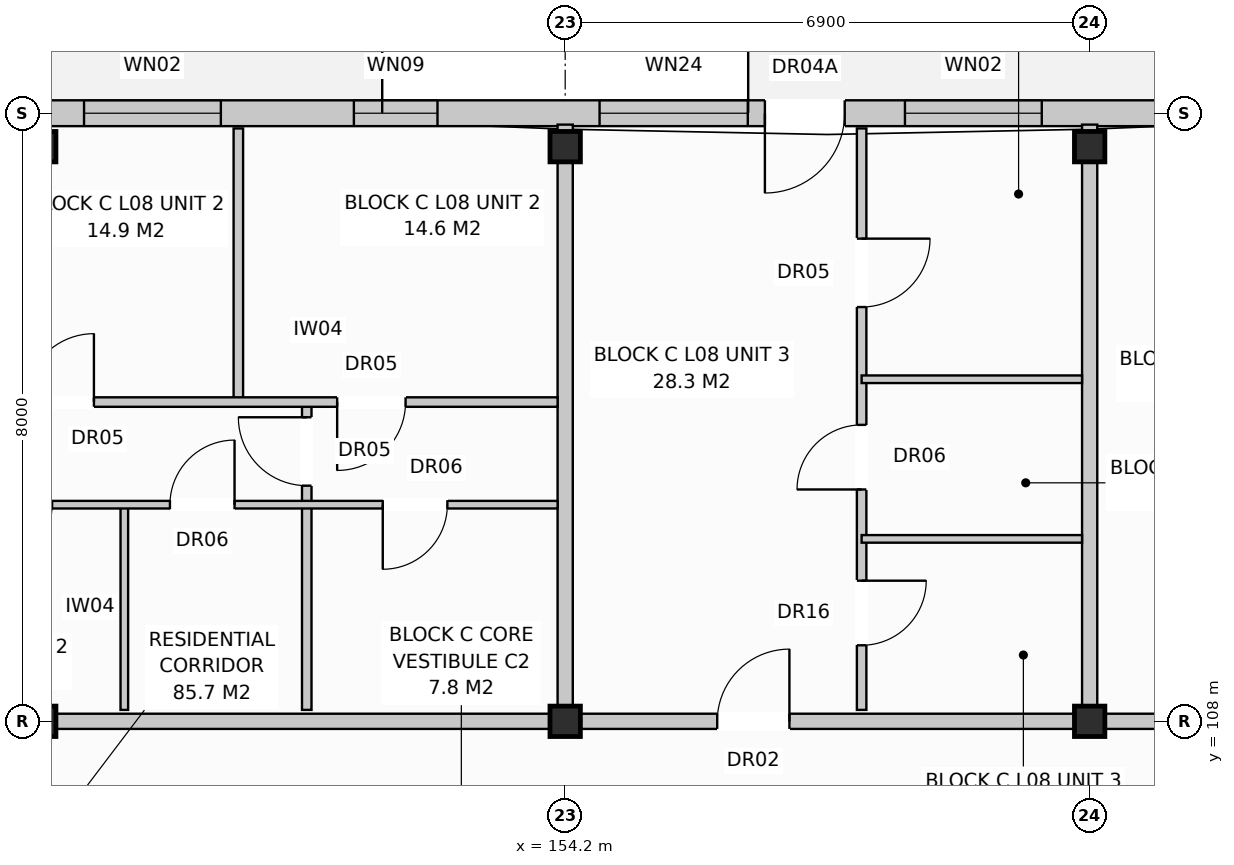
"""IFC4 building model, lengths in metres.
Left out: names, types, materials, properties, quantities, classifications, styles, units other than length and angle.
Written with IfcOpenShell. Run it as: python <this file> out.ifc"""

import sys

from ifc_helpers import new_model, si_unit, direction, frame, frame_2d, origin, origin_with_axes, origin_2d, place, context, subcontext, project, spatial, rectangle, extrude, element, fill, save


model = new_model("IFC4")
c1 = context("Model", 3, precision=1e-05, world=origin(), true_north=direction((0.0, 1.0)))
c2 = subcontext(c1, "Body", "Model", "MODEL_VIEW")
j1 = project(units=[si_unit("LENGTHUNIT", "METRE"), si_unit("PLANEANGLEUNIT", "RADIAN")], contexts=[c1])
p1 = place(None, origin())
s1 = spatial("IfcSite", under=j1, at=p1, CompositionType="ELEMENT")
p2 = place(p1, origin())
s2 = spatial("IfcBuilding", under=s1, at=p2, CompositionType="ELEMENT")
p3 = place(p2, frame((0.0, 0.0, 27.2)))
s3 = spatial("IfcBuildingStorey", under=s2, at=p3, CompositionType="ELEMENT", Elevation=27.2)
for number, where, z_axis, x_axis in (
    (1, (147.3, 108.0, 0.0), (0.0, 0.0, 1.0), (1.0, 0.0, 0.0)),
    (2, (147.3, 115.56, 0.0), (0.0, 0.0, 1.0), (1.0, 0.0, 0.0)),
    (3, (154.2, 108.0, 0.0), (0.0, 0.0, 1.0), (1.0, 0.0, 0.0)),
    (4, (154.2, 115.56, 0.0), (0.0, 0.0, 1.0), (1.0, 0.0, 0.0)),
    (5, (161.1, 108.0, 0.0), (0.0, 0.0, 1.0), (1.0, 0.0, 0.0)),
    (6, (161.1, 115.56, 0.0), (0.0, 0.0, 1.0), (1.0, 0.0, 0.0)),
):
    element("IfcColumn", number, at=place(p3, frame(where, z_axis=z_axis, x_axis=x_axis)), inside=s3, PredefinedType="COLUMN", context=c2, shape_type="SweptSolid", body=[
        extrude(rectangle(XDim=0.4, YDim=0.4, at=origin_2d()), origin(), (0.0, 0.0, 1.0), 3.2),
    ])
p4 = place(p3, frame((126.76, 116.0, 0.0), z_axis=(0.0, 0.0, 1.0), x_axis=(1.0, 0.0, 0.0)))
e7 = element("IfcWall", 7, at=p4, inside=s3, PredefinedType="STANDARD", context=c2, shape_type="SweptSolid", body=[
    extrude(rectangle(XDim=41.08, YDim=0.34, at=frame_2d((20.54, 0.0))), origin(), (0.0, 0.0, 1.0), 2.96),
])
p5 = place(p4, frame((2.767, 0.0, 0.0)))
e8 = element("IfcOpeningElement", 8, at=p5, cuts=e7, PredefinedType="OPENING", context=c2, shape_type="SweptSolid", body=[
    extrude(rectangle(XDim=1.05, YDim=2.12, at=frame_2d((0.525, 1.06))), frame((0.0, 0.182, 0.0), z_axis=(0.0, -1.0, 0.0), x_axis=(1.0, 0.0, 0.0)), (0.0, 0.0, 1.0), 0.364),
])
p6 = place(p4, frame((17.567, 0.0, 0.0)))
e9 = element("IfcOpeningElement", 9, at=p6, cuts=e7, PredefinedType="OPENING", context=c2, shape_type="SweptSolid", body=[
    extrude(rectangle(XDim=1.05, YDim=2.12, at=frame_2d((0.525, 1.06))), frame((0.0, 0.182, 0.0), z_axis=(0.0, -1.0, 0.0), x_axis=(1.0, 0.0, 0.0)), (0.0, 0.0, 1.0), 0.364),
])
p7 = place(p4, frame((30.067, 0.0, 0.0)))
e10 = element("IfcOpeningElement", 10, at=p7, cuts=e7, PredefinedType="OPENING", context=c2, shape_type="SweptSolid", body=[
    extrude(rectangle(XDim=1.05, YDim=2.12, at=frame_2d((0.525, 1.06))), frame((0.0, 0.182, 0.0), z_axis=(0.0, -1.0, 0.0), x_axis=(1.0, 0.0, 0.0)), (0.0, 0.0, 1.0), 0.364),
])
p8 = place(p4, frame((0.642, 0.0, 0.8)))
e11 = element("IfcOpeningElement", 11, at=p8, cuts=e7, PredefinedType="OPENING", context=c2, shape_type="SweptSolid", body=[
    extrude(rectangle(XDim=1.9, YDim=1.85, at=frame_2d((0.95, 0.925))), frame((0.0, 0.182, 0.0), z_axis=(0.0, -1.0, 0.0), x_axis=(1.0, 0.0, 0.0)), (0.0, 0.0, 1.0), 0.364),
])
p9 = place(p4, frame((4.41, 0.0, 0.8)))
e12 = element("IfcOpeningElement", 12, at=p9, cuts=e7, PredefinedType="OPENING", context=c2, shape_type="SweptSolid", body=[
    extrude(rectangle(XDim=1.8, YDim=1.7, at=frame_2d((0.9, 0.85))), frame((0.0, 0.182, 0.0), z_axis=(0.0, -1.0, 0.0), x_axis=(1.0, 0.0, 0.0)), (0.0, 0.0, 1.0), 0.364),
])
p10 = place(p4, frame((10.46, 0.0, 0.72)))
e13 = element("IfcOpeningElement", 13, at=p10, cuts=e7, PredefinedType="OPENING", context=c2, shape_type="SweptSolid", body=[
    extrude(rectangle(XDim=1.1, YDim=1.5, at=frame_2d((0.55, 0.75))), frame((0.0, 0.182, 0.0), z_axis=(0.0, -1.0, 0.0), x_axis=(1.0, 0.0, 0.0)), (0.0, 0.0, 1.0), 0.364),
])
p11 = place(p4, frame((15.76, 0.0, 0.72)))
e14 = element("IfcOpeningElement", 14, at=p11, cuts=e7, PredefinedType="OPENING", context=c2, shape_type="SweptSolid", body=[
    extrude(rectangle(XDim=1.1, YDim=1.5, at=frame_2d((0.55, 0.75))), frame((0.0, 0.182, 0.0), z_axis=(0.0, -1.0, 0.0), x_axis=(1.0, 0.0, 0.0)), (0.0, 0.0, 1.0), 0.364),
])
p12 = place(p4, frame((21.11, 0.0, 0.8)))
e15 = element("IfcOpeningElement", 15, at=p12, cuts=e7, PredefinedType="OPENING", context=c2, shape_type="SweptSolid", body=[
    extrude(rectangle(XDim=1.8, YDim=1.7, at=frame_2d((0.9, 0.85))), frame((0.0, 0.182, 0.0), z_axis=(0.0, -1.0, 0.0), x_axis=(1.0, 0.0, 0.0)), (0.0, 0.0, 1.0), 0.364),
])
p13 = place(p4, frame((24.66, 0.0, 0.72)))
e16 = element("IfcOpeningElement", 16, at=p13, cuts=e7, PredefinedType="OPENING", context=c2, shape_type="SweptSolid", body=[
    extrude(rectangle(XDim=1.1, YDim=1.5, at=frame_2d((0.55, 0.75))), frame((0.0, 0.182, 0.0), z_axis=(0.0, -1.0, 0.0), x_axis=(1.0, 0.0, 0.0)), (0.0, 0.0, 1.0), 0.364),
])
p14 = place(p4, frame((27.892, 0.0, 0.8)))
e17 = element("IfcOpeningElement", 17, at=p14, cuts=e7, PredefinedType="OPENING", context=c2, shape_type="SweptSolid", body=[
    extrude(rectangle(XDim=1.95, YDim=1.65, at=frame_2d((0.975, 0.825))), frame((0.0, 0.182, 0.0), z_axis=(0.0, -1.0, 0.0), x_axis=(1.0, 0.0, 0.0)), (0.0, 0.0, 1.0), 0.364),
])
p15 = place(p4, frame((31.91, 0.0, 0.8)))
e18 = element("IfcOpeningElement", 18, at=p15, cuts=e7, PredefinedType="OPENING", context=c2, shape_type="SweptSolid", body=[
    extrude(rectangle(XDim=1.8, YDim=1.7, at=frame_2d((0.9, 0.85))), frame((0.0, 0.182, 0.0), z_axis=(0.0, -1.0, 0.0), x_axis=(1.0, 0.0, 0.0)), (0.0, 0.0, 1.0), 0.364),
])
p16 = place(p4, frame((35.36, 0.0, 0.72)))
e19 = element("IfcOpeningElement", 19, at=p16, cuts=e7, PredefinedType="OPENING", context=c2, shape_type="SweptSolid", body=[
    extrude(rectangle(XDim=1.9, YDim=1.85, at=frame_2d((0.95, 0.925))), frame((0.0, 0.182, 0.0), z_axis=(0.0, -1.0, 0.0), x_axis=(1.0, 0.0, 0.0)), (0.0, 0.0, 1.0), 0.364),
])
p17 = place(p4, frame((38.525, 0.0, 0.8)))
e20 = element("IfcOpeningElement", 20, at=p17, cuts=e7, PredefinedType="OPENING", context=c2, shape_type="SweptSolid", body=[
    extrude(rectangle(XDim=1.95, YDim=1.65, at=frame_2d((0.975, 0.825))), frame((0.0, 0.182, 0.0), z_axis=(0.0, -1.0, 0.0), x_axis=(1.0, 0.0, 0.0)), (0.0, 0.0, 1.0), 0.364),
])
p18 = place(p3, frame((154.2, 108.15, 0.0), z_axis=(0.0, 0.0, 1.0), x_axis=(0.0, 1.0, 0.0)))
e21 = element("IfcWall", 21, at=p18, inside=s3, PredefinedType="PARTITIONING", context=c2, shape_type="SweptSolid", body=[
    extrude(rectangle(XDim=7.7, YDim=0.2, at=frame_2d((3.85, 0.0))), origin(), (0.0, 0.0, 1.0), 2.96),
])
p19 = place(p3, frame((140.4, 108.0, 0.0), z_axis=(0.0, 0.0, 1.0), x_axis=(1.0, 0.0, 0.0)))
e22 = element("IfcWall", 22, at=p19, inside=s3, PredefinedType="PARTITIONING", context=c2, shape_type="SweptSolid", body=[
    extrude(rectangle(XDim=13.8, YDim=0.2, at=frame_2d((6.9, 0.0))), origin(), (0.0, 0.0, 1.0), 2.4),
])
p20 = place(p19, frame((2.4, 0.0, 0.0)))
e23 = element("IfcOpeningElement", 23, at=p20, cuts=e22, PredefinedType="OPENING", context=c2, shape_type="SweptSolid", body=[
    extrude(rectangle(XDim=0.95, YDim=2.15, at=frame_2d((0.475, 1.075))), frame((0.0, 0.112, 0.0), z_axis=(0.0, -1.0, 0.0), x_axis=(1.0, 0.0, 0.0)), (0.0, 0.0, 1.0), 0.224),
])
p21 = place(p3, frame((148.4, 108.15, 0.0), z_axis=(0.0, 0.0, 1.0), x_axis=(0.0, 1.0, 0.0)))
e24 = element("IfcWall", 24, at=p21, inside=s3, PredefinedType="PARTITIONING", context=c2, shape_type="SweptSolid", body=[
    extrude(rectangle(XDim=2.7, YDim=0.1, at=frame_2d((1.35, 0.0))), origin(), (0.0, 0.0, 1.0), 2.96),
])
p22 = place(p3, frame((150.8, 108.15, 0.0), z_axis=(0.0, 0.0, 1.0), x_axis=(0.0, 1.0, 0.0)))
e25 = element("IfcWall", 25, at=p22, inside=s3, PredefinedType="PARTITIONING", context=c2, shape_type="SweptSolid", body=[
    extrude(rectangle(XDim=4.05, YDim=0.125, at=frame_2d((2.025, 0.0))), origin(), (0.0, 0.0, 1.0), 2.59),
])
p23 = place(p22, frame((2.95, 0.0, 0.0)))
e26 = element("IfcOpeningElement", 26, at=p23, cuts=e25, PredefinedType="OPENING", context=c2, shape_type="SweptSolid", body=[
    extrude(rectangle(XDim=0.9, YDim=2.1, at=frame_2d((0.45, 1.05))), frame((0.0, 0.074, 0.0), z_axis=(0.0, -1.0, 0.0), x_axis=(1.0, 0.0, 0.0)), (0.0, 0.0, 1.0), 0.149),
])
p24 = place(p3, frame((149.9, 112.2, 0.0), z_axis=(0.0, 0.0, 1.0), x_axis=(0.0, 1.0, 0.0)))
e27 = element("IfcWall", 27, at=p24, inside=s3, PredefinedType="PARTITIONING", context=c2, shape_type="SweptSolid", body=[
    extrude(rectangle(XDim=3.6, YDim=0.125, at=frame_2d((1.8, 0.0))), origin(), (0.0, 0.0, 1.0), 2.96),
])
p25 = place(p3, frame((145.6, 110.85, 0.0), z_axis=(0.0, 0.0, 1.0), x_axis=(1.0, 0.0, 0.0)))
e28 = element("IfcWall", 28, at=p25, inside=s3, PredefinedType="PARTITIONING", context=c2, shape_type="SweptSolid", body=[
    extrude(rectangle(XDim=8.5, YDim=0.1, at=frame_2d((4.25, 0.0))), origin(), (0.0, 0.0, 1.0), 2.96),
])
p26 = place(p25, frame((1.0, 0.0, 0.0)))
e29 = element("IfcOpeningElement", 29, at=p26, cuts=e28, PredefinedType="OPENING", context=c2, shape_type="SweptSolid", body=[
    extrude(rectangle(XDim=0.85, YDim=2.1, at=frame_2d((0.425, 1.05))), frame((0.0, 0.062, 0.0), z_axis=(0.0, -1.0, 0.0), x_axis=(1.0, 0.0, 0.0)), (0.0, 0.0, 1.0), 0.124),
])
p27 = place(p25, frame((3.4, 0.0, 0.0)))
e30 = element("IfcOpeningElement", 30, at=p27, cuts=e28, PredefinedType="OPENING", context=c2, shape_type="SweptSolid", body=[
    extrude(rectangle(XDim=0.85, YDim=2.05, at=frame_2d((0.425, 1.025))), frame((0.0, 0.062, 0.0), z_axis=(0.0, -1.0, 0.0), x_axis=(1.0, 0.0, 0.0)), (0.0, 0.0, 1.0), 0.124),
])
p28 = place(p25, frame((6.2, 0.0, 0.0)))
e31 = element("IfcOpeningElement", 31, at=p28, cuts=e28, PredefinedType="OPENING", context=c2, shape_type="SweptSolid", body=[
    extrude(rectangle(XDim=0.85, YDim=2.05, at=frame_2d((0.425, 1.025))), frame((0.0, 0.062, 0.0), z_axis=(0.0, -1.0, 0.0), x_axis=(1.0, 0.0, 0.0)), (0.0, 0.0, 1.0), 0.124),
])
p29 = place(p3, frame((145.6, 112.2, 0.0), z_axis=(0.0, 0.0, 1.0), x_axis=(1.0, 0.0, 0.0)))
e32 = element("IfcWall", 32, at=p29, inside=s3, PredefinedType="PARTITIONING", context=c2, shape_type="SweptSolid", body=[
    extrude(rectangle(XDim=8.5, YDim=0.125, at=frame_2d((4.25, 0.0))), origin(), (0.0, 0.0, 1.0), 2.96),
])
p30 = place(p29, frame((1.5, 0.0, 0.0)))
e33 = element("IfcOpeningElement", 33, at=p30, cuts=e32, PredefinedType="OPENING", context=c2, shape_type="SweptSolid", body=[
    extrude(rectangle(XDim=0.9, YDim=2.1, at=frame_2d((0.45, 1.05))), frame((0.0, 0.074, 0.0), z_axis=(0.0, -1.0, 0.0), x_axis=(1.0, 0.0, 0.0)), (0.0, 0.0, 1.0), 0.149),
])
p31 = place(p29, frame((5.6, 0.0, 0.0)))
e34 = element("IfcOpeningElement", 34, at=p31, cuts=e32, PredefinedType="OPENING", context=c2, shape_type="SweptSolid", body=[
    extrude(rectangle(XDim=0.9, YDim=2.1, at=frame_2d((0.45, 1.05))), frame((0.0, 0.074, 0.0), z_axis=(0.0, -1.0, 0.0), x_axis=(1.0, 0.0, 0.0)), (0.0, 0.0, 1.0), 0.149),
])
p32 = place(p3, frame((161.1, 108.15, 0.0), z_axis=(0.0, 0.0, 1.0), x_axis=(0.0, 1.0, 0.0)))
e35 = element("IfcWall", 35, at=p32, inside=s3, PredefinedType="PARTITIONING", context=c2, shape_type="SweptSolid", body=[
    extrude(rectangle(XDim=7.7, YDim=0.2, at=frame_2d((3.85, 0.0))), origin(), (0.0, 0.0, 1.0), 2.4),
])
p33 = place(p3, frame((154.2, 108.0, 0.0), z_axis=(0.0, 0.0, 1.0), x_axis=(1.0, 0.0, 0.0)))
e36 = element("IfcWall", 36, at=p33, inside=s3, PredefinedType="PARTITIONING", context=c2, shape_type="SweptSolid", body=[
    extrude(rectangle(XDim=6.9, YDim=0.2, at=frame_2d((3.45, 0.0))), origin(), (0.0, 0.0, 1.0), 2.4),
])
p34 = place(p33, frame((2.0, 0.0, 0.0)))
e37 = element("IfcOpeningElement", 37, at=p34, cuts=e36, PredefinedType="OPENING", context=c2, shape_type="SweptSolid", body=[
    extrude(rectangle(XDim=0.95, YDim=2.15, at=frame_2d((0.475, 1.075))), frame((0.0, 0.112, 0.0), z_axis=(0.0, -1.0, 0.0), x_axis=(1.0, 0.0, 0.0)), (0.0, 0.0, 1.0), 0.224),
])
p35 = place(p3, frame((158.1, 108.15, 0.0), z_axis=(0.0, 0.0, 1.0), x_axis=(0.0, 1.0, 0.0)))
e38 = element("IfcWall", 38, at=p35, inside=s3, PredefinedType="PARTITIONING", context=c2, shape_type="SweptSolid", body=[
    extrude(rectangle(XDim=7.65, YDim=0.125, at=frame_2d((3.825, 0.0))), origin(), (0.0, 0.0, 1.0), 2.96),
])
p36 = place(p35, frame((0.85, 0.0, 0.0)))
e39 = element("IfcOpeningElement", 39, at=p36, cuts=e38, PredefinedType="OPENING", context=c2, shape_type="SweptSolid", body=[
    extrude(rectangle(XDim=0.85, YDim=2.1, at=frame_2d((0.425, 1.05))), frame((0.0, 0.074, 0.0), z_axis=(0.0, -1.0, 0.0), x_axis=(1.0, 0.0, 0.0)), (0.0, 0.0, 1.0), 0.149),
])
p37 = place(p35, frame((2.9, 0.0, 0.0)))
e40 = element("IfcOpeningElement", 40, at=p37, cuts=e38, PredefinedType="OPENING", context=c2, shape_type="SweptSolid", body=[
    extrude(rectangle(XDim=0.85, YDim=2.05, at=frame_2d((0.425, 1.025))), frame((0.0, 0.074, 0.0), z_axis=(0.0, -1.0, 0.0), x_axis=(1.0, 0.0, 0.0)), (0.0, 0.0, 1.0), 0.149),
])
p38 = place(p35, frame((5.3, 0.0, 0.0)))
e41 = element("IfcOpeningElement", 41, at=p38, cuts=e38, PredefinedType="OPENING", context=c2, shape_type="SweptSolid", body=[
    extrude(rectangle(XDim=0.9, YDim=2.1, at=frame_2d((0.45, 1.05))), frame((0.0, 0.074, 0.0), z_axis=(0.0, -1.0, 0.0), x_axis=(1.0, 0.0, 0.0)), (0.0, 0.0, 1.0), 0.149),
])
for number, where, z_axis, x_axis in (
    (42, (158.1, 110.4, 0.0), (0.0, 0.0, 1.0), (1.0, 0.0, 0.0)),
    (43, (158.1, 112.5, 0.0), (0.0, 0.0, 1.0), (1.0, 0.0, 0.0)),
):
    element("IfcWall", number, at=place(p3, frame(where, z_axis=z_axis, x_axis=x_axis)), inside=s3, PredefinedType="PARTITIONING", context=c2, shape_type="SweptSolid", body=[
        extrude(rectangle(XDim=2.9, YDim=0.1, at=frame_2d((1.45, 0.0))), origin(), (0.0, 0.0, 1.0), 2.96),
    ])
p39 = place(p3, frame((161.1, 108.0, 0.0), z_axis=(0.0, 0.0, 1.0), x_axis=(1.0, 0.0, 0.0)))
e44 = element("IfcWall", 44, at=p39, inside=s3, PredefinedType="PARTITIONING", context=c2, shape_type="SweptSolid", body=[
    extrude(rectangle(XDim=6.9, YDim=0.2, at=frame_2d((3.45, 0.0))), origin(), (0.0, 0.0, 1.0), 2.4),
])
p40 = place(p39, frame((2.0, 0.0, 0.0)))
e45 = element("IfcOpeningElement", 45, at=p40, cuts=e44, PredefinedType="OPENING", context=c2, shape_type="SweptSolid", body=[
    extrude(rectangle(XDim=0.95, YDim=2.15, at=frame_2d((0.475, 1.075))), frame((0.0, 0.112, 0.0), z_axis=(0.0, -1.0, 0.0), x_axis=(1.0, 0.0, 0.0)), (0.0, 0.0, 1.0), 0.224),
])
p41 = place(p7, frame((1.05, 0.0, 0.0), z_axis=(0.0, 0.0, 1.0), x_axis=(-1.0, 0.0, 0.0)))
e46 = element("IfcDoor", 46, at=p41, inside=s3, OperationType="SINGLE_SWING_LEFT", PredefinedType="DOOR", context=c2, shape_type="SweptSolid", body=[
    extrude(rectangle(XDim=1.05, YDim=2.12, at=frame_2d((0.525, 1.06))), frame((0.0, 0.025, 0.0), z_axis=(0.0, -1.0, 0.0), x_axis=(1.0, 0.0, 0.0)), (0.0, 0.0, 1.0), 0.05),
])
fill(e10, e46)
p42 = place(p12, origin_with_axes())
e47 = element("IfcWindow", 47, at=p42, inside=s3, PartitioningType="SINGLE_PANEL", PredefinedType="WINDOW", context=c2, shape_type="SweptSolid", body=[
    extrude(rectangle(XDim=1.8, YDim=1.7, at=frame_2d((0.9, 0.85))), frame((0.0, 0.03, 0.0), z_axis=(0.0, -1.0, 0.0), x_axis=(1.0, 0.0, 0.0)), (0.0, 0.0, 1.0), 0.06),
])
fill(e15, e47)
p43 = place(p13, origin_with_axes())
e48 = element("IfcWindow", 48, at=p43, inside=s3, PartitioningType="SINGLE_PANEL", PredefinedType="WINDOW", context=c2, shape_type="SweptSolid", body=[
    extrude(rectangle(XDim=1.1, YDim=1.5, at=frame_2d((0.55, 0.75))), frame((0.0, 0.03, 0.0), z_axis=(0.0, -1.0, 0.0), x_axis=(1.0, 0.0, 0.0)), (0.0, 0.0, 1.0), 0.06),
])
fill(e16, e48)
p44 = place(p14, origin_with_axes())
e49 = element("IfcWindow", 49, at=p44, inside=s3, PartitioningType="SINGLE_PANEL", PredefinedType="WINDOW", context=c2, shape_type="SweptSolid", body=[
    extrude(rectangle(XDim=1.95, YDim=1.65, at=frame_2d((0.975, 0.825))), frame((0.0, 0.03, 0.0), z_axis=(0.0, -1.0, 0.0), x_axis=(1.0, 0.0, 0.0)), (0.0, 0.0, 1.0), 0.06),
])
fill(e17, e49)
p45 = place(p15, origin_with_axes())
e50 = element("IfcWindow", 50, at=p45, inside=s3, PartitioningType="SINGLE_PANEL", PredefinedType="WINDOW", context=c2, shape_type="SweptSolid", body=[
    extrude(rectangle(XDim=1.8, YDim=1.7, at=frame_2d((0.9, 0.85))), frame((0.0, 0.03, 0.0), z_axis=(0.0, -1.0, 0.0), x_axis=(1.0, 0.0, 0.0)), (0.0, 0.0, 1.0), 0.06),
])
fill(e18, e50)
p46 = place(p23, origin_with_axes())
e51 = element("IfcDoor", 51, at=p46, inside=s3, OperationType="SINGLE_SWING_RIGHT", PredefinedType="DOOR", context=c2, shape_type="SweptSolid", body=[
    extrude(rectangle(XDim=0.9, YDim=2.1, at=frame_2d((0.45, 1.05))), frame((0.0, 0.025, 0.0), z_axis=(0.0, -1.0, 0.0), x_axis=(1.0, 0.0, 0.0)), (0.0, 0.0, 1.0), 0.05),
])
fill(e26, e51)
p47 = place(p26, frame((0.85, 0.0, 0.0), z_axis=(0.0, 0.0, 1.0), x_axis=(-1.0, 0.0, 0.0)))
e52 = element("IfcDoor", 52, at=p47, inside=s3, OperationType="SINGLE_SWING_LEFT", PredefinedType="DOOR", context=c2, shape_type="SweptSolid", body=[
    extrude(rectangle(XDim=0.85, YDim=2.1, at=frame_2d((0.425, 1.05))), frame((0.0, 0.025, 0.0), z_axis=(0.0, -1.0, 0.0), x_axis=(1.0, 0.0, 0.0)), (0.0, 0.0, 1.0), 0.05),
])
fill(e29, e52)
p48 = place(p27, origin_with_axes())
e53 = element("IfcDoor", 53, at=p48, inside=s3, OperationType="SINGLE_SWING_RIGHT", PredefinedType="DOOR", context=c2, shape_type="SweptSolid", body=[
    extrude(rectangle(XDim=0.85, YDim=2.05, at=frame_2d((0.425, 1.025))), frame((0.0, 0.025, 0.0), z_axis=(0.0, -1.0, 0.0), x_axis=(1.0, 0.0, 0.0)), (0.0, 0.0, 1.0), 0.05),
])
fill(e30, e53)
p49 = place(p28, frame((0.85, 0.0, 0.0), z_axis=(0.0, 0.0, 1.0), x_axis=(-1.0, 0.0, 0.0)))
e54 = element("IfcDoor", 54, at=p49, inside=s3, OperationType="SINGLE_SWING_LEFT", PredefinedType="DOOR", context=c2, shape_type="SweptSolid", body=[
    extrude(rectangle(XDim=0.85, YDim=2.05, at=frame_2d((0.425, 1.025))), frame((0.0, 0.025, 0.0), z_axis=(0.0, -1.0, 0.0), x_axis=(1.0, 0.0, 0.0)), (0.0, 0.0, 1.0), 0.05),
])
fill(e31, e54)
p50 = place(p30, origin_with_axes())
e55 = element("IfcDoor", 55, at=p50, inside=s3, OperationType="SINGLE_SWING_RIGHT", PredefinedType="DOOR", context=c2, shape_type="SweptSolid", body=[
    extrude(rectangle(XDim=0.9, YDim=2.1, at=frame_2d((0.45, 1.05))), frame((0.0, 0.025, 0.0), z_axis=(0.0, -1.0, 0.0), x_axis=(1.0, 0.0, 0.0)), (0.0, 0.0, 1.0), 0.05),
])
fill(e33, e55)
p51 = place(p31, frame((0.9, 0.0, 0.0), z_axis=(0.0, 0.0, 1.0), x_axis=(-1.0, 0.0, 0.0)))
e56 = element("IfcDoor", 56, at=p51, inside=s3, OperationType="SINGLE_SWING_LEFT", PredefinedType="DOOR", context=c2, shape_type="SweptSolid", body=[
    extrude(rectangle(XDim=0.9, YDim=2.1, at=frame_2d((0.45, 1.05))), frame((0.0, 0.025, 0.0), z_axis=(0.0, -1.0, 0.0), x_axis=(1.0, 0.0, 0.0)), (0.0, 0.0, 1.0), 0.05),
])
fill(e34, e56)
p52 = place(p34, origin_with_axes())
e57 = element("IfcDoor", 57, at=p52, inside=s3, OperationType="SINGLE_SWING_RIGHT", PredefinedType="DOOR", context=c2, shape_type="SweptSolid", body=[
    extrude(rectangle(XDim=0.95, YDim=2.15, at=frame_2d((0.475, 1.075))), frame((0.0, 0.025, 0.0), z_axis=(0.0, -1.0, 0.0), x_axis=(1.0, 0.0, 0.0)), (0.0, 0.0, 1.0), 0.05),
])
fill(e37, e57)
p53 = place(p36, frame((0.85, 0.0, 0.0), z_axis=(0.0, 0.0, 1.0), x_axis=(-1.0, 0.0, 0.0)))
e58 = element("IfcDoor", 58, at=p53, inside=s3, OperationType="SINGLE_SWING_RIGHT", PredefinedType="DOOR", context=c2, shape_type="SweptSolid", body=[
    extrude(rectangle(XDim=0.85, YDim=2.1, at=frame_2d((0.425, 1.05))), frame((0.0, 0.025, 0.0), z_axis=(0.0, -1.0, 0.0), x_axis=(1.0, 0.0, 0.0)), (0.0, 0.0, 1.0), 0.05),
])
fill(e39, e58)
p54 = place(p37, origin_with_axes())
e59 = element("IfcDoor", 59, at=p54, inside=s3, OperationType="SINGLE_SWING_LEFT", PredefinedType="DOOR", context=c2, shape_type="SweptSolid", body=[
    extrude(rectangle(XDim=0.85, YDim=2.05, at=frame_2d((0.425, 1.025))), frame((0.0, 0.025, 0.0), z_axis=(0.0, -1.0, 0.0), x_axis=(1.0, 0.0, 0.0)), (0.0, 0.0, 1.0), 0.05),
])
fill(e40, e59)
p55 = place(p38, frame((0.9, 0.0, 0.0), z_axis=(0.0, 0.0, 1.0), x_axis=(-1.0, 0.0, 0.0)))
e60 = element("IfcDoor", 60, at=p55, inside=s3, OperationType="SINGLE_SWING_RIGHT", PredefinedType="DOOR", context=c2, shape_type="SweptSolid", body=[
    extrude(rectangle(XDim=0.9, YDim=2.1, at=frame_2d((0.45, 1.05))), frame((0.0, 0.025, 0.0), z_axis=(0.0, -1.0, 0.0), x_axis=(1.0, 0.0, 0.0)), (0.0, 0.0, 1.0), 0.05),
])
fill(e41, e60)
save(model, sys.argv[1])
